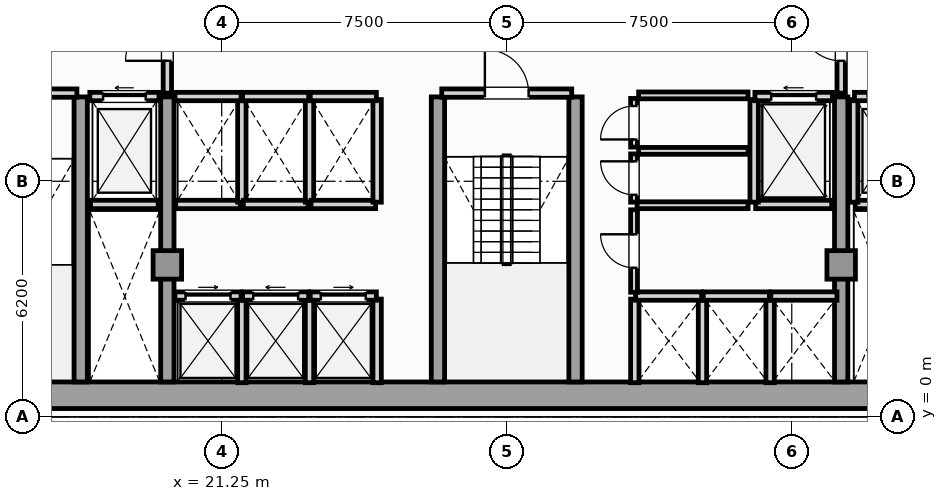
"""IFC4 building model, lengths in metres.
Left out: names, types, materials, properties, quantities, classifications, styles, units other than length and angle.
Written with IfcOpenShell. Run it as: python <this file> out.ifc"""

import sys

from ifc_helpers import new_model, si_unit, direction, frame, frame_2d, origin, origin_2d, place, context, subcontext, project, spatial, rectangle, extrude, element, fill, save


model = new_model("IFC4")
c1 = context("Model", 3, precision=1e-05, world=origin(), true_north=direction((0.0, 1.0)))
c2 = subcontext(c1, "Body", "Model", "MODEL_VIEW")
j1 = project(units=[si_unit("LENGTHUNIT", "METRE"), si_unit("PLANEANGLEUNIT", "RADIAN")], contexts=[c1])
p1 = place(None, origin())
s1 = spatial("IfcSite", under=j1, at=p1, CompositionType="ELEMENT")
p2 = place(p1, origin())
s2 = spatial("IfcBuilding", under=s1, at=p2, CompositionType="ELEMENT")
p3 = place(p2, frame((0.0, 0.0, 119.55)))
s3 = spatial("IfcBuildingStorey", under=s2, at=p3, CompositionType="ELEMENT", Elevation=119.55)
p4 = place(p3, frame((13.25, 0.57, 0.0), z_axis=(0.0, 0.0, 1.0), x_axis=(1.0, 0.0, 0.0)))
e1 = element("IfcWall", 1, at=p4, inside=s3, PredefinedType="SHEAR", context=c2, shape_type="SweptSolid", body=[
    extrude(rectangle(XDim=31.0, YDim=0.7, at=frame_2d((15.5, 0.0))), origin(), (0.0, 0.0, 1.0), 3.6),
])
for number, where, z_axis, x_axis in (
    (2, (17.54, 0.92, 0.0), (0.0, 0.0, 1.0), (0.0, 1.0, 0.0)),
    (3, (19.82, 0.92, 0.0), (0.0, 0.0, 1.0), (0.0, 1.0, 0.0)),
    (4, (26.94, 0.92, 0.0), (0.0, 0.0, 1.0), (0.0, 1.0, 0.0)),
    (5, (30.56, 0.92, 0.0), (0.0, 0.0, 1.0), (0.0, 1.0, 0.0)),
    (6, (37.55, 0.92, 0.0), (0.0, 0.0, 1.0), (0.0, 1.0, 0.0)),
):
    element("IfcWall", number, at=place(p3, frame(where, z_axis=z_axis, x_axis=x_axis)), inside=s3, PredefinedType="SHEAR", context=c2, shape_type="SweptSolid", body=[
        extrude(rectangle(XDim=7.5, YDim=0.35, at=frame_2d((3.75, 0.0))), origin(), (0.0, 0.0, 1.0), 3.6),
    ])
for number, where, z_axis, x_axis in (
    (7, (19.82, 4.0, 0.0), (0.0, 0.0, 1.0), (1.0, 0.0, 0.0)),
    (8, (37.55, 4.0, 0.0), (0.0, 0.0, 1.0), (1.0, 0.0, 0.0)),
):
    element("IfcColumn", number, at=place(p3, frame(where, z_axis=z_axis, x_axis=x_axis)), inside=s3, PredefinedType="COLUMN", context=c2, shape_type="SweptSolid", body=[
        extrude(rectangle(XDim=0.75, YDim=0.75, at=origin_2d()), origin(), (0.0, 0.0, 1.0), 3.85),
    ])
p5 = place(p3, frame((17.8, 5.59, 0.0), z_axis=(0.0, 0.0, 1.0), x_axis=(1.0, 0.0, 0.0)))
e9 = element("IfcWall", 9, at=p5, inside=s3, PredefinedType="SOLIDWALL", context=c2, shape_type="SweptSolid", body=[
    extrude(rectangle(XDim=1.78, YDim=0.22, at=frame_2d((0.89, 0.0))), origin(), (0.0, 0.0, 1.0), 3.6),
])
p6 = place(p3, frame((17.78, 8.43, 0.0), z_axis=(0.0, 0.0, 1.0), x_axis=(1.0, 0.0, 0.0)))
e10 = element("IfcWall", 10, at=p6, inside=s3, PredefinedType="SOLIDWALL", context=c2, shape_type="SweptSolid", body=[
    extrude(rectangle(XDim=1.82, YDim=0.22, at=frame_2d((0.91, 0.0))), origin(), (0.0, 0.0, 1.0), 3.6),
])
p7 = place(p6, frame((0.35, 0.0, 0.0)))
e11 = element("IfcOpeningElement", 11, at=p7, cuts=e10, PredefinedType="OPENING", context=c2, shape_type="SweptSolid", body=[
    extrude(rectangle(XDim=1.12, YDim=2.25, at=frame_2d((0.56, 1.125))), frame((0.0, 0.12, 0.0), z_axis=(0.0, -1.0, 0.0), x_axis=(1.0, 0.0, 0.0)), (0.0, 0.0, 1.0), 0.24),
])
p8 = place(p3, frame((37.92, 5.59, 0.0), z_axis=(0.0, 0.0, 1.0), x_axis=(1.0, 0.0, 0.0)))
e12 = element("IfcWall", 12, at=p8, inside=s3, PredefinedType="SOLIDWALL", context=c2, shape_type="SweptSolid", body=[
    extrude(rectangle(XDim=1.78, YDim=0.22, at=frame_2d((0.89, 0.0))), origin(), (0.0, 0.0, 1.0), 3.6),
])
p9 = place(p3, frame((37.88, 5.65, 0.0), z_axis=(0.0, 0.0, 1.0), x_axis=(0.0, 1.0, 0.0)))
e13 = element("IfcWall", 13, at=p9, inside=s3, PredefinedType="SOLIDWALL", context=c2, shape_type="SweptSolid", body=[
    extrude(rectangle(XDim=2.7, YDim=0.22, at=frame_2d((1.35, 0.0))), origin(), (0.0, 0.0, 1.0), 3.6),
])
p10 = place(p3, frame((37.9, 8.43, 0.0), z_axis=(0.0, 0.0, 1.0), x_axis=(1.0, 0.0, 0.0)))
e14 = element("IfcWall", 14, at=p10, inside=s3, PredefinedType="SOLIDWALL", context=c2, shape_type="SweptSolid", body=[
    extrude(rectangle(XDim=1.82, YDim=0.22, at=frame_2d((0.91, 0.0))), origin(), (0.0, 0.0, 1.0), 3.6),
])
p11 = place(p10, frame((0.35, 0.0, 0.0)))
e15 = element("IfcOpeningElement", 15, at=p11, cuts=e14, PredefinedType="OPENING", context=c2, shape_type="SweptSolid", body=[
    extrude(rectangle(XDim=1.12, YDim=2.25, at=frame_2d((0.56, 1.125))), frame((0.0, 0.12, 0.0), z_axis=(0.0, -1.0, 0.0), x_axis=(1.0, 0.0, 0.0)), (0.0, 0.0, 1.0), 0.24),
])
p12 = place(p3, frame((35.3, 5.59, 0.0), z_axis=(0.0, 0.0, 1.0), x_axis=(1.0, 0.0, 0.0)))
e16 = element("IfcWall", 16, at=p12, inside=s3, PredefinedType="SOLIDWALL", context=c2, shape_type="SweptSolid", body=[
    extrude(rectangle(XDim=2.0, YDim=0.22, at=frame_2d((1.0, 0.0))), origin(), (0.0, 0.0, 1.0), 3.6),
])
p13 = place(p3, frame((35.26, 5.65, 0.0), z_axis=(0.0, 0.0, 1.0), x_axis=(0.0, 1.0, 0.0)))
e17 = element("IfcWall", 17, at=p13, inside=s3, PredefinedType="SOLIDWALL", context=c2, shape_type="SweptSolid", body=[
    extrude(rectangle(XDim=2.7, YDim=0.22, at=frame_2d((1.35, 0.0))), origin(), (0.0, 0.0, 1.0), 3.6),
])
p14 = place(p3, frame((35.28, 8.43, 0.0), z_axis=(0.0, 0.0, 1.0), x_axis=(1.0, 0.0, 0.0)))
e18 = element("IfcWall", 18, at=p14, inside=s3, PredefinedType="SOLIDWALL", context=c2, shape_type="SweptSolid", body=[
    extrude(rectangle(XDim=2.04, YDim=0.22, at=frame_2d((1.02, 0.0))), origin(), (0.0, 0.0, 1.0), 3.6),
])
p15 = place(p14, frame((0.43, 0.0, 0.0)))
e19 = element("IfcOpeningElement", 19, at=p15, cuts=e18, PredefinedType="OPENING", context=c2, shape_type="SweptSolid", body=[
    extrude(rectangle(XDim=1.18, YDim=2.2, at=frame_2d((0.59, 1.1))), frame((0.0, 0.12, 0.0), z_axis=(0.0, -1.0, 0.0), x_axis=(1.0, 0.0, 0.0)), (0.0, 0.0, 1.0), 0.24),
])
p16 = place(p3, frame((21.78, 0.9, 0.0), z_axis=(0.0, 0.0, 1.0), x_axis=(0.0, 1.0, 0.0)))
e20 = element("IfcWall", 20, at=p16, inside=s3, PredefinedType="SOLIDWALL", context=c2, shape_type="SweptSolid", body=[
    extrude(rectangle(XDim=2.2, YDim=0.22, at=frame_2d((1.1, 0.0))), origin(), (0.0, 0.0, 1.0), 3.6),
])
p17 = place(p3, frame((20.02, 3.18, 0.0), z_axis=(0.0, 0.0, 1.0), x_axis=(1.0, 0.0, 0.0)))
e21 = element("IfcWall", 21, at=p17, inside=s3, PredefinedType="SOLIDWALL", context=c2, shape_type="SweptSolid", body=[
    extrude(rectangle(XDim=1.74, YDim=0.22, at=frame_2d((0.87, 0.0))), origin(), (0.0, 0.0, 1.0), 3.6),
])
p18 = place(p17, frame((0.28, 0.0, 0.0)))
e22 = element("IfcOpeningElement", 22, at=p18, cuts=e21, PredefinedType="OPENING", context=c2, shape_type="SweptSolid", body=[
    extrude(rectangle(XDim=1.18, YDim=2.2, at=frame_2d((0.59, 1.1))), frame((0.0, 0.12, 0.0), z_axis=(0.0, -1.0, 0.0), x_axis=(1.0, 0.0, 0.0)), (0.0, 0.0, 1.0), 0.24),
])
p19 = place(p3, frame((23.56, 0.9, 0.0), z_axis=(0.0, 0.0, 1.0), x_axis=(0.0, 1.0, 0.0)))
e23 = element("IfcWall", 23, at=p19, inside=s3, PredefinedType="SOLIDWALL", context=c2, shape_type="SweptSolid", body=[
    extrude(rectangle(XDim=2.2, YDim=0.22, at=frame_2d((1.1, 0.0))), origin(), (0.0, 0.0, 1.0), 3.6),
])
p20 = place(p3, frame((21.8, 3.18, 0.0), z_axis=(0.0, 0.0, 1.0), x_axis=(1.0, 0.0, 0.0)))
e24 = element("IfcWall", 24, at=p20, inside=s3, PredefinedType="SOLIDWALL", context=c2, shape_type="SweptSolid", body=[
    extrude(rectangle(XDim=1.74, YDim=0.22, at=frame_2d((0.87, 0.0))), origin(), (0.0, 0.0, 1.0), 3.6),
])
p21 = place(p20, frame((0.28, 0.0, 0.0)))
e25 = element("IfcOpeningElement", 25, at=p21, cuts=e24, PredefinedType="OPENING", context=c2, shape_type="SweptSolid", body=[
    extrude(rectangle(XDim=1.18, YDim=2.2, at=frame_2d((0.59, 1.1))), frame((0.0, 0.12, 0.0), z_axis=(0.0, -1.0, 0.0), x_axis=(1.0, 0.0, 0.0)), (0.0, 0.0, 1.0), 0.24),
])
p22 = place(p3, frame((25.34, 0.9, 0.0), z_axis=(0.0, 0.0, 1.0), x_axis=(0.0, 1.0, 0.0)))
e26 = element("IfcWall", 26, at=p22, inside=s3, PredefinedType="SOLIDWALL", context=c2, shape_type="SweptSolid", body=[
    extrude(rectangle(XDim=2.2, YDim=0.22, at=frame_2d((1.1, 0.0))), origin(), (0.0, 0.0, 1.0), 3.6),
])
p23 = place(p3, frame((23.58, 3.18, 0.0), z_axis=(0.0, 0.0, 1.0), x_axis=(1.0, 0.0, 0.0)))
e27 = element("IfcWall", 27, at=p23, inside=s3, PredefinedType="SOLIDWALL", context=c2, shape_type="SweptSolid", body=[
    extrude(rectangle(XDim=1.74, YDim=0.22, at=frame_2d((0.87, 0.0))), origin(), (0.0, 0.0, 1.0), 3.6),
])
p24 = place(p23, frame((0.28, 0.0, 0.0)))
e28 = element("IfcOpeningElement", 28, at=p24, cuts=e27, PredefinedType="OPENING", context=c2, shape_type="SweptSolid", body=[
    extrude(rectangle(XDim=1.18, YDim=2.2, at=frame_2d((0.59, 1.1))), frame((0.0, 0.12, 0.0), z_axis=(0.0, -1.0, 0.0), x_axis=(1.0, 0.0, 0.0)), (0.0, 0.0, 1.0), 0.24),
])
for number, where, z_axis, x_axis in (
    (29, (32.12, 0.9, 0.0), (0.0, 0.0, 1.0), (0.0, 1.0, 0.0)),
    (30, (33.9, 0.9, 0.0), (0.0, 0.0, 1.0), (0.0, 1.0, 0.0)),
):
    element("IfcWall", number, at=place(p3, frame(where, z_axis=z_axis, x_axis=x_axis)), inside=s3, PredefinedType="SOLIDWALL", context=c2, shape_type="SweptSolid", body=[
        extrude(rectangle(XDim=2.2, YDim=0.22, at=frame_2d((1.1, 0.0))), origin(), (0.0, 0.0, 1.0), 3.6),
    ])
p25 = place(p3, frame((32.14, 3.18, 0.0), z_axis=(0.0, 0.0, 1.0), x_axis=(1.0, 0.0, 0.0)))
e31 = element("IfcWall", 31, at=p25, inside=s3, PredefinedType="SOLIDWALL", context=c2, shape_type="SweptSolid", body=[
    extrude(rectangle(XDim=1.74, YDim=0.22, at=frame_2d((0.87, 0.0))), origin(), (0.0, 0.0, 1.0), 3.6),
])
p26 = place(p3, frame((35.68, 0.9, 0.0), z_axis=(0.0, 0.0, 1.0), x_axis=(0.0, 1.0, 0.0)))
e32 = element("IfcWall", 32, at=p26, inside=s3, PredefinedType="SOLIDWALL", context=c2, shape_type="SweptSolid", body=[
    extrude(rectangle(XDim=2.2, YDim=0.22, at=frame_2d((1.1, 0.0))), origin(), (0.0, 0.0, 1.0), 3.6),
])
for number, where, z_axis, x_axis in (
    (33, (33.92, 3.18, 0.0), (0.0, 0.0, 1.0), (1.0, 0.0, 0.0)),
    (34, (35.7, 3.18, 0.0), (0.0, 0.0, 1.0), (1.0, 0.0, 0.0)),
):
    element("IfcWall", number, at=place(p3, frame(where, z_axis=z_axis, x_axis=x_axis)), inside=s3, PredefinedType="SOLIDWALL", context=c2, shape_type="SweptSolid", body=[
        extrude(rectangle(XDim=1.74, YDim=0.22, at=frame_2d((0.87, 0.0))), origin(), (0.0, 0.0, 1.0), 3.6),
    ])
p27 = place(p3, frame((20.04, 5.59, 0.0), z_axis=(0.0, 0.0, 1.0), x_axis=(1.0, 0.0, 0.0)))
e35 = element("IfcWall", 35, at=p27, inside=s3, PredefinedType="SOLIDWALL", context=c2, shape_type="SweptSolid", body=[
    extrude(rectangle(XDim=1.7, YDim=0.22, at=frame_2d((0.85, 0.0))), origin(), (0.0, 0.0, 1.0), 3.6),
])
p28 = place(p3, frame((21.78, 5.65, 0.0), z_axis=(0.0, 0.0, 1.0), x_axis=(0.0, 1.0, 0.0)))
e36 = element("IfcWall", 36, at=p28, inside=s3, PredefinedType="SOLIDWALL", context=c2, shape_type="SweptSolid", body=[
    extrude(rectangle(XDim=2.7, YDim=0.22, at=frame_2d((1.35, 0.0))), origin(), (0.0, 0.0, 1.0), 3.6),
])
p29 = place(p3, frame((20.02, 8.43, 0.0), z_axis=(0.0, 0.0, 1.0), x_axis=(1.0, 0.0, 0.0)))
e37 = element("IfcWall", 37, at=p29, inside=s3, PredefinedType="SOLIDWALL", context=c2, shape_type="SweptSolid", body=[
    extrude(rectangle(XDim=1.74, YDim=0.22, at=frame_2d((0.87, 0.0))), origin(), (0.0, 0.0, 1.0), 3.6),
])
p30 = place(p3, frame((21.82, 5.59, 0.0), z_axis=(0.0, 0.0, 1.0), x_axis=(1.0, 0.0, 0.0)))
e38 = element("IfcWall", 38, at=p30, inside=s3, PredefinedType="SOLIDWALL", context=c2, shape_type="SweptSolid", body=[
    extrude(rectangle(XDim=1.7, YDim=0.22, at=frame_2d((0.85, 0.0))), origin(), (0.0, 0.0, 1.0), 3.6),
])
p31 = place(p3, frame((23.56, 5.65, 0.0), z_axis=(0.0, 0.0, 1.0), x_axis=(0.0, 1.0, 0.0)))
e39 = element("IfcWall", 39, at=p31, inside=s3, PredefinedType="SOLIDWALL", context=c2, shape_type="SweptSolid", body=[
    extrude(rectangle(XDim=2.7, YDim=0.22, at=frame_2d((1.35, 0.0))), origin(), (0.0, 0.0, 1.0), 3.6),
])
p32 = place(p3, frame((21.8, 8.43, 0.0), z_axis=(0.0, 0.0, 1.0), x_axis=(1.0, 0.0, 0.0)))
e40 = element("IfcWall", 40, at=p32, inside=s3, PredefinedType="SOLIDWALL", context=c2, shape_type="SweptSolid", body=[
    extrude(rectangle(XDim=1.74, YDim=0.22, at=frame_2d((0.87, 0.0))), origin(), (0.0, 0.0, 1.0), 3.6),
])
p33 = place(p3, frame((23.6, 5.59, 0.0), z_axis=(0.0, 0.0, 1.0), x_axis=(1.0, 0.0, 0.0)))
e41 = element("IfcWall", 41, at=p33, inside=s3, PredefinedType="SOLIDWALL", context=c2, shape_type="SweptSolid", body=[
    extrude(rectangle(XDim=1.7, YDim=0.22, at=frame_2d((0.85, 0.0))), origin(), (0.0, 0.0, 1.0), 3.6),
])
p34 = place(p3, frame((25.34, 5.65, 0.0), z_axis=(0.0, 0.0, 1.0), x_axis=(0.0, 1.0, 0.0)))
e42 = element("IfcWall", 42, at=p34, inside=s3, PredefinedType="SOLIDWALL", context=c2, shape_type="SweptSolid", body=[
    extrude(rectangle(XDim=2.7, YDim=0.22, at=frame_2d((1.35, 0.0))), origin(), (0.0, 0.0, 1.0), 3.6),
])
p35 = place(p3, frame((23.58, 8.43, 0.0), z_axis=(0.0, 0.0, 1.0), x_axis=(1.0, 0.0, 0.0)))
e43 = element("IfcWall", 43, at=p35, inside=s3, PredefinedType="SOLIDWALL", context=c2, shape_type="SweptSolid", body=[
    extrude(rectangle(XDim=1.74, YDim=0.22, at=frame_2d((0.87, 0.0))), origin(), (0.0, 0.0, 1.0), 3.6),
])
p36 = place(p3, frame((14.04, 8.52, 0.0), z_axis=(0.0, 0.0, 1.0), x_axis=(1.0, 0.0, 0.0)))
e44 = element("IfcWall", 44, at=p36, inside=s3, PredefinedType="SOLIDWALL", context=c2, shape_type="SweptSolid", body=[
    extrude(rectangle(XDim=3.4, YDim=0.22, at=frame_2d((1.7, 0.0))), origin(), (0.0, 0.0, 1.0), 3.6),
])
p37 = place(p36, frame((1.125, 0.0, 0.0)))
e45 = element("IfcOpeningElement", 45, at=p37, cuts=e44, PredefinedType="OPENING", context=c2, shape_type="SweptSolid", body=[
    extrude(rectangle(XDim=1.15, YDim=2.2, at=frame_2d((0.575, 1.1))), frame((0.0, 0.12, 0.0), z_axis=(0.0, -1.0, 0.0), x_axis=(1.0, 0.0, 0.0)), (0.0, 0.0, 1.0), 0.24),
])
p38 = place(p3, frame((27.04, 8.52, 0.0), z_axis=(0.0, 0.0, 1.0), x_axis=(1.0, 0.0, 0.0)))
e46 = element("IfcWall", 46, at=p38, inside=s3, PredefinedType="SOLIDWALL", context=c2, shape_type="SweptSolid", body=[
    extrude(rectangle(XDim=3.42, YDim=0.22, at=frame_2d((1.71, 0.0))), origin(), (0.0, 0.0, 1.0), 3.6),
])
p39 = place(p38, frame((1.135, 0.0, 0.0)))
e47 = element("IfcOpeningElement", 47, at=p39, cuts=e46, PredefinedType="OPENING", context=c2, shape_type="SweptSolid", body=[
    extrude(rectangle(XDim=1.15, YDim=2.2, at=frame_2d((0.575, 1.1))), frame((0.0, 0.12, 0.0), z_axis=(0.0, -1.0, 0.0), x_axis=(1.0, 0.0, 0.0)), (0.0, 0.0, 1.0), 0.24),
])
p40 = place(p3, frame((19.82, 8.52, 0.0), z_axis=(0.0, 0.0, 1.0), x_axis=(0.0, 1.0, 0.0)))
e48 = element("IfcWall", 48, at=p40, inside=s3, PredefinedType="SOLIDWALL", context=c2, shape_type="SweptSolid", body=[
    extrude(rectangle(XDim=2.8, YDim=0.22, at=frame_2d((1.4, 0.0))), origin(), (0.0, 0.0, 1.0), 3.055),
])
p41 = place(p40, frame((0.85, 0.0, 0.0)))
e49 = element("IfcOpeningElement", 49, at=p41, cuts=e48, PredefinedType="OPENING", context=c2, shape_type="SweptSolid", body=[
    extrude(rectangle(XDim=1.1, YDim=2.2, at=frame_2d((0.55, 1.1))), frame((0.0, 0.12, 0.0), z_axis=(0.0, -1.0, 0.0), x_axis=(1.0, 0.0, 0.0)), (0.0, 0.0, 1.0), 0.24),
])
p42 = place(p3, frame((37.55, 8.52, 0.0), z_axis=(0.0, 0.0, 1.0), x_axis=(0.0, 1.0, 0.0)))
e50 = element("IfcWall", 50, at=p42, inside=s3, PredefinedType="SOLIDWALL", context=c2, shape_type="SweptSolid", body=[
    extrude(rectangle(XDim=2.8, YDim=0.22, at=frame_2d((1.4, 0.0))), origin(), (0.0, 0.0, 1.0), 3.055),
])
p43 = place(p42, frame((0.85, 0.0, 0.0)))
e51 = element("IfcOpeningElement", 51, at=p43, cuts=e50, PredefinedType="OPENING", context=c2, shape_type="SweptSolid", body=[
    extrude(rectangle(XDim=1.1, YDim=2.2, at=frame_2d((0.55, 1.1))), frame((0.0, 0.12, 0.0), z_axis=(0.0, -1.0, 0.0), x_axis=(1.0, 0.0, 0.0)), (0.0, 0.0, 1.0), 0.24),
])
p44 = place(p3, frame((32.1, 5.65, 0.0), z_axis=(0.0, 0.0, 1.0), x_axis=(0.0, 1.0, 0.0)))
e52 = element("IfcWall", 52, at=p44, inside=s3, PredefinedType="PARTITIONING", context=c2, shape_type="SweptSolid", body=[
    extrude(rectangle(XDim=1.27, YDim=0.18, at=frame_2d((0.635, 0.0))), origin(), (0.0, 0.0, 1.0), 3.6),
])
p45 = place(p44, frame((0.195, 0.0, 0.0)))
e53 = element("IfcOpeningElement", 53, at=p45, cuts=e52, PredefinedType="OPENING", context=c2, shape_type="SweptSolid", body=[
    extrude(rectangle(XDim=0.88, YDim=2.05, at=frame_2d((0.44, 1.025))), frame((0.0, 0.1, 0.0), z_axis=(0.0, -1.0, 0.0), x_axis=(1.0, 0.0, 0.0)), (0.0, 0.0, 1.0), 0.2),
])
p46 = place(p3, frame((32.22, 7.0, 0.0), z_axis=(0.0, 0.0, 1.0), x_axis=(1.0, 0.0, 0.0)))
e54 = element("IfcWall", 54, at=p46, inside=s3, PredefinedType="PARTITIONING", context=c2, shape_type="SweptSolid", body=[
    extrude(rectangle(XDim=2.88, YDim=0.18, at=frame_2d((1.44, 0.0))), origin(), (0.0, 0.0, 1.0), 3.6),
])
p47 = place(p3, frame((32.18, 5.57, 0.0), z_axis=(0.0, 0.0, 1.0), x_axis=(1.0, 0.0, 0.0)))
e55 = element("IfcWall", 55, at=p47, inside=s3, PredefinedType="PARTITIONING", context=c2, shape_type="SweptSolid", body=[
    extrude(rectangle(XDim=2.92, YDim=0.18, at=frame_2d((1.46, 0.0))), origin(), (0.0, 0.0, 1.0), 3.6),
])
p48 = place(p3, frame((32.1, 7.1, 0.0), z_axis=(0.0, 0.0, 1.0), x_axis=(0.0, 1.0, 0.0)))
e56 = element("IfcWall", 56, at=p48, inside=s3, PredefinedType="PARTITIONING", context=c2, shape_type="SweptSolid", body=[
    extrude(rectangle(XDim=1.28, YDim=0.18, at=frame_2d((0.64, 0.0))), origin(), (0.0, 0.0, 1.0), 3.6),
])
p49 = place(p48, frame((0.2, 0.0, 0.0)))
e57 = element("IfcOpeningElement", 57, at=p49, cuts=e56, PredefinedType="OPENING", context=c2, shape_type="SweptSolid", body=[
    extrude(rectangle(XDim=0.88, YDim=2.05, at=frame_2d((0.44, 1.025))), frame((0.0, 0.1, 0.0), z_axis=(0.0, -1.0, 0.0), x_axis=(1.0, 0.0, 0.0)), (0.0, 0.0, 1.0), 0.2),
])
p50 = place(p3, frame((32.22, 8.46, 0.0), z_axis=(0.0, 0.0, 1.0), x_axis=(1.0, 0.0, 0.0)))
e58 = element("IfcWall", 58, at=p50, inside=s3, PredefinedType="PARTITIONING", context=c2, shape_type="SweptSolid", body=[
    extrude(rectangle(XDim=2.88, YDim=0.18, at=frame_2d((1.44, 0.0))), origin(), (0.0, 0.0, 1.0), 3.6),
])
p51 = place(p3, frame((32.1, 3.28, 0.0), z_axis=(0.0, 0.0, 1.0), x_axis=(0.0, 1.0, 0.0)))
e59 = element("IfcWall", 59, at=p51, inside=s3, PredefinedType="PARTITIONING", context=c2, shape_type="SweptSolid", body=[
    extrude(rectangle(XDim=2.17, YDim=0.18, at=frame_2d((1.085, 0.0))), origin(), (0.0, 0.0, 1.0), 3.6),
])
p52 = place(p51, frame((0.645, 0.0, 0.0)))
e60 = element("IfcOpeningElement", 60, at=p52, cuts=e59, PredefinedType="OPENING", context=c2, shape_type="SweptSolid", body=[
    extrude(rectangle(XDim=0.88, YDim=2.05, at=frame_2d((0.44, 1.025))), frame((0.0, 0.1, 0.0), z_axis=(0.0, -1.0, 0.0), x_axis=(1.0, 0.0, 0.0)), (0.0, 0.0, 1.0), 0.2),
])
p53 = place(p7, origin())
e61 = element("IfcDoor", 61, at=p53, inside=s3, OperationType="SLIDING_TO_LEFT", PredefinedType="DOOR", context=c2, shape_type="SweptSolid", body=[
    extrude(rectangle(XDim=1.12, YDim=2.25, at=frame_2d((0.56, 1.125))), frame((0.0, 0.025, 0.0), z_axis=(0.0, -1.0, 0.0), x_axis=(1.0, 0.0, 0.0)), (0.0, 0.0, 1.0), 0.05),
])
fill(e11, e61)
p54 = place(p15, origin())
e62 = element("IfcDoor", 62, at=p54, inside=s3, OperationType="SLIDING_TO_LEFT", PredefinedType="DOOR", context=c2, shape_type="SweptSolid", body=[
    extrude(rectangle(XDim=1.18, YDim=2.2, at=frame_2d((0.59, 1.1))), frame((0.0, 0.025, 0.0), z_axis=(0.0, -1.0, 0.0), x_axis=(1.0, 0.0, 0.0)), (0.0, 0.0, 1.0), 0.05),
])
fill(e19, e62)
p55 = place(p18, origin())
e63 = element("IfcDoor", 63, at=p55, inside=s3, OperationType="SLIDING_TO_RIGHT", PredefinedType="DOOR", context=c2, shape_type="SweptSolid", body=[
    extrude(rectangle(XDim=1.18, YDim=2.2, at=frame_2d((0.59, 1.1))), frame((0.0, 0.025, 0.0), z_axis=(0.0, -1.0, 0.0), x_axis=(1.0, 0.0, 0.0)), (0.0, 0.0, 1.0), 0.05),
])
fill(e22, e63)
p56 = place(p21, origin())
e64 = element("IfcDoor", 64, at=p56, inside=s3, OperationType="SLIDING_TO_LEFT", PredefinedType="DOOR", context=c2, shape_type="SweptSolid", body=[
    extrude(rectangle(XDim=1.18, YDim=2.2, at=frame_2d((0.59, 1.1))), frame((0.0, 0.025, 0.0), z_axis=(0.0, -1.0, 0.0), x_axis=(1.0, 0.0, 0.0)), (0.0, 0.0, 1.0), 0.05),
])
fill(e25, e64)
p57 = place(p24, origin())
e65 = element("IfcDoor", 65, at=p57, inside=s3, OperationType="SLIDING_TO_RIGHT", PredefinedType="DOOR", context=c2, shape_type="SweptSolid", body=[
    extrude(rectangle(XDim=1.18, YDim=2.2, at=frame_2d((0.59, 1.1))), frame((0.0, 0.025, 0.0), z_axis=(0.0, -1.0, 0.0), x_axis=(1.0, 0.0, 0.0)), (0.0, 0.0, 1.0), 0.05),
])
fill(e28, e65)
p58 = place(p39, origin())
e66 = element("IfcDoor", 66, at=p58, inside=s3, OperationType="SINGLE_SWING_LEFT", PredefinedType="DOOR", context=c2, shape_type="SweptSolid", body=[
    extrude(rectangle(XDim=1.15, YDim=2.2, at=frame_2d((0.575, 1.1))), frame((0.0, 0.025, 0.0), z_axis=(0.0, -1.0, 0.0), x_axis=(1.0, 0.0, 0.0)), (0.0, 0.0, 1.0), 0.05),
])
fill(e47, e66)
p59 = place(p41, origin())
e67 = element("IfcDoor", 67, at=p59, inside=s3, OperationType="SINGLE_SWING_LEFT", PredefinedType="DOOR", context=c2, shape_type="SweptSolid", body=[
    extrude(rectangle(XDim=1.1, YDim=2.2, at=frame_2d((0.55, 1.1))), frame((0.0, 0.025, 0.0), z_axis=(0.0, -1.0, 0.0), x_axis=(1.0, 0.0, 0.0)), (0.0, 0.0, 1.0), 0.05),
])
fill(e49, e67)
p60 = place(p43, origin())
e68 = element("IfcDoor", 68, at=p60, inside=s3, OperationType="SINGLE_SWING_RIGHT", PredefinedType="DOOR", context=c2, shape_type="SweptSolid", body=[
    extrude(rectangle(XDim=1.1, YDim=2.2, at=frame_2d((0.55, 1.1))), frame((0.0, 0.025, 0.0), z_axis=(0.0, -1.0, 0.0), x_axis=(1.0, 0.0, 0.0)), (0.0, 0.0, 1.0), 0.05),
])
fill(e51, e68)
p61 = place(p45, origin())
e69 = element("IfcDoor", 69, at=p61, inside=s3, OperationType="SINGLE_SWING_RIGHT", PredefinedType="DOOR", context=c2, shape_type="SweptSolid", body=[
    extrude(rectangle(XDim=0.88, YDim=2.05, at=frame_2d((0.44, 1.025))), frame((0.0, 0.025, 0.0), z_axis=(0.0, -1.0, 0.0), x_axis=(1.0, 0.0, 0.0)), (0.0, 0.0, 1.0), 0.05),
])
fill(e53, e69)
p62 = place(p49, origin())
e70 = element("IfcDoor", 70, at=p62, inside=s3, OperationType="SINGLE_SWING_LEFT", PredefinedType="DOOR", context=c2, shape_type="SweptSolid", body=[
    extrude(rectangle(XDim=0.88, YDim=2.05, at=frame_2d((0.44, 1.025))), frame((0.0, 0.025, 0.0), z_axis=(0.0, -1.0, 0.0), x_axis=(1.0, 0.0, 0.0)), (0.0, 0.0, 1.0), 0.05),
])
fill(e57, e70)
p63 = place(p52, origin())
e71 = element("IfcDoor", 71, at=p63, inside=s3, OperationType="SINGLE_SWING_RIGHT", PredefinedType="DOOR", context=c2, shape_type="SweptSolid", body=[
    extrude(rectangle(XDim=0.88, YDim=2.05, at=frame_2d((0.44, 1.025))), frame((0.0, 0.025, 0.0), z_axis=(0.0, -1.0, 0.0), x_axis=(1.0, 0.0, 0.0)), (0.0, 0.0, 1.0), 0.05),
])
fill(e60, e71)
save(model, sys.argv[1])
